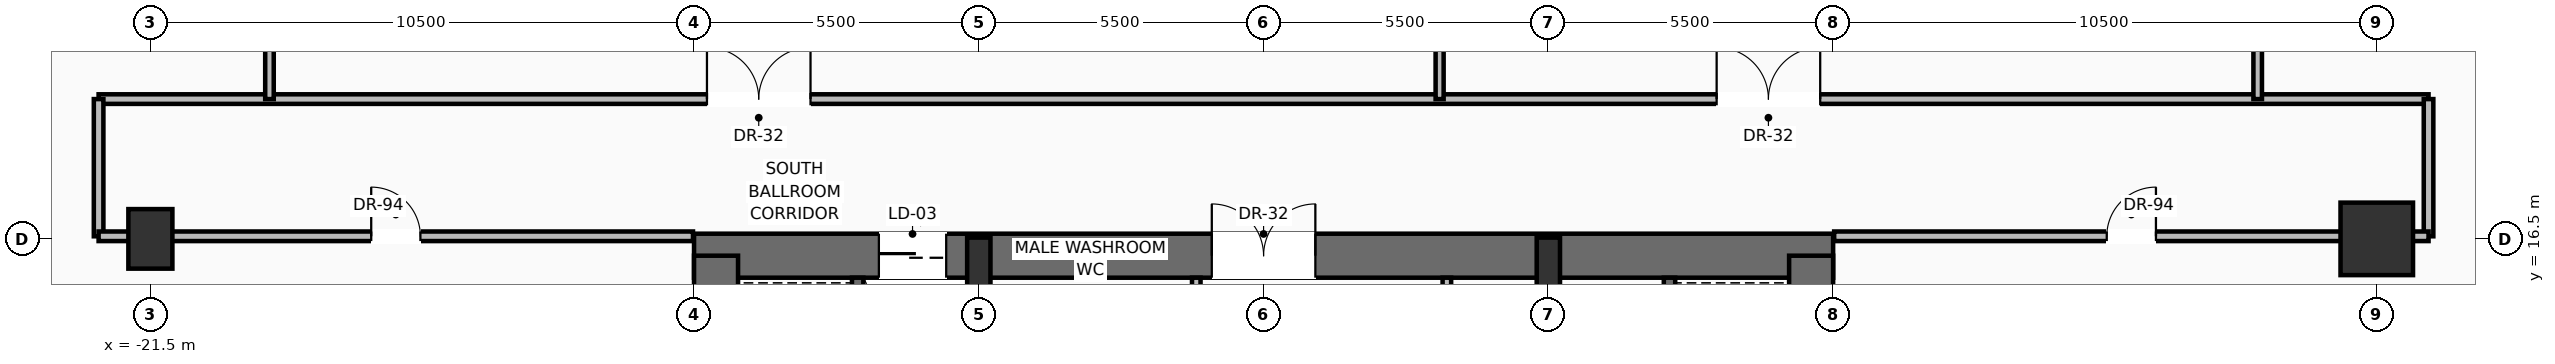
"""IFC4 building model, lengths in metres.
Left out: names, types, materials, properties, quantities, classifications, styles, units other than length and angle.
Written with IfcOpenShell. Run it as: python <this file> out.ifc"""

import sys

from ifc_helpers import new_model, si_unit, direction, frame, frame_2d, origin, origin_2d, place, context, subcontext, project, spatial, rectangle, hollow_rectangle, extrude, source, transform, mapped, element, fill, save


model = new_model("IFC4")
c1 = context("Model", 3, precision=1e-05, world=origin(), true_north=direction((0.0, 1.0)))
c2 = subcontext(c1, "Body", "Model", "MODEL_VIEW")
j1 = project(units=[si_unit("LENGTHUNIT", "METRE"), si_unit("PLANEANGLEUNIT", "RADIAN")], contexts=[c1])
p1 = place(None, origin())
s1 = spatial("IfcSite", under=j1, at=p1, CompositionType="ELEMENT")
p2 = place(p1, origin())
s2 = spatial("IfcBuilding", under=s1, at=p2, CompositionType="ELEMENT")
p3 = place(p2, frame((0.0, 0.0, 16.5)))
s3 = spatial("IfcBuildingStorey", under=s2, at=p3, CompositionType="ELEMENT", Elevation=16.5)
p4 = place(p3, frame((-11.0, 16.175, 0.0), z_axis=(0.0, 0.0, 1.0), x_axis=(1.0, 0.0, 0.0)))
e1 = element("IfcWall", 1, at=p4, inside=s3, PredefinedType="SHEAR", context=c2, shape_type="SweptSolid", body=[
    extrude(rectangle(XDim=22.0, YDim=0.85, at=frame_2d((11.0, 0.0))), origin(), (0.0, 0.0, 1.0), 5.05),
])
p5 = place(p4, frame((3.57, 0.0, 0.0)))
e2 = element("IfcOpeningElement", 2, at=p5, cuts=e1, PredefinedType="OPENING", context=c2, shape_type="SweptSolid", body=[
    extrude(rectangle(XDim=1.3, YDim=2.3, at=frame_2d((0.65, 1.15))), frame((0.0, 0.435, 0.0), z_axis=(0.0, -1.0, 0.0), x_axis=(1.0, 0.0, 0.0)), (0.0, 0.0, 1.0), 0.87),
])
p6 = place(p4, frame((10.0, 0.0, 0.0)))
e3 = element("IfcOpeningElement", 3, at=p6, cuts=e1, PredefinedType="OPENING", context=c2, shape_type="SweptSolid", body=[
    extrude(rectangle(XDim=2.0, YDim=2.4, at=frame_2d((1.0, 1.2))), frame((0.0, 0.435, 0.0), z_axis=(0.0, -1.0, 0.0), x_axis=(1.0, 0.0, 0.0)), (0.0, 0.0, 1.0), 0.87),
])
for number, where, z_axis, x_axis in (
    (4, (-10.575, 0.425, 0.0), (0.0, 0.0, 1.0), (0.0, 1.0, 0.0)),
    (5, (10.575, 0.425, 0.0), (0.0, 0.0, 1.0), (0.0, 1.0, 0.0)),
):
    element("IfcWall", number, at=place(p3, frame(where, z_axis=z_axis, x_axis=x_axis)), inside=s3, PredefinedType="SHEAR", context=c2, shape_type="SweptSolid", body=[
        extrude(rectangle(XDim=15.75, YDim=0.85, at=frame_2d((7.875, 0.0))), origin(), (0.0, 0.0, 1.0), 5.05),
    ])
p7 = place(p3, frame((-5.5, 0.425, 0.0), z_axis=(0.0, 0.0, 1.0), x_axis=(0.0, 1.0, 0.0)))
e6 = element("IfcWall", 6, at=p7, inside=s3, PredefinedType="SHEAR", context=c2, shape_type="SweptSolid", body=[
    extrude(rectangle(XDim=15.75, YDim=0.4, at=frame_2d((7.875, 0.0))), origin(), (0.0, 0.0, 1.0), 5.05),
])
p8 = place(p7, frame((9.075, 0.0, 0.0)))
e7 = element("IfcOpeningElement", 7, at=p8, cuts=e6, PredefinedType="OPENING", context=c2, shape_type="SweptSolid", body=[
    extrude(rectangle(XDim=1.1, YDim=2.2, at=frame_2d((0.55, 1.1))), frame((0.0, 0.21, 0.0), z_axis=(0.0, -1.0, 0.0), x_axis=(1.0, 0.0, 0.0)), (0.0, 0.0, 1.0), 0.42),
])
p9 = place(p3, frame((5.5, 0.425, 0.0), z_axis=(0.0, 0.0, 1.0), x_axis=(0.0, 1.0, 0.0)))
e8 = element("IfcWall", 8, at=p9, inside=s3, PredefinedType="SHEAR", context=c2, shape_type="SweptSolid", body=[
    extrude(rectangle(XDim=15.75, YDim=0.4, at=frame_2d((7.875, 0.0))), origin(), (0.0, 0.0, 1.0), 5.05),
])
p10 = place(p9, frame((9.075, 0.0, 0.0)))
e9 = element("IfcOpeningElement", 9, at=p10, cuts=e8, PredefinedType="OPENING", context=c2, shape_type="SweptSolid", body=[
    extrude(rectangle(XDim=1.1, YDim=2.2, at=frame_2d((0.55, 1.1))), frame((0.0, 0.21, 0.0), z_axis=(0.0, -1.0, 0.0), x_axis=(1.0, 0.0, 0.0)), (0.0, 0.0, 1.0), 0.42),
])
m1 = source(origin(), c2, "Body", "SweptSolid", [
    extrude(rectangle(XDim=0.45, YDim=0.95, at=origin_2d()), origin(), (0.0, 0.0, 1.0), 5.5),
])
for number, where, z_axis, x_axis in (
    (10, (-5.5, 16.05, 0.0), (0.0, 0.0, 1.0), (1.0, 0.0, 0.0)),
    (11, (5.5, 16.05, 0.0), (0.0, 0.0, 1.0), (1.0, 0.0, 0.0)),
):
    element("IfcColumn", number, at=place(p3, frame(where, z_axis=z_axis, x_axis=x_axis)), inside=s3, PredefinedType="PILASTER", context=c2, shape_type="MappedRepresentation", body=[
        mapped(m1, transform((0.0, 0.0, 0.0), scale=1.0)),
    ])
m2 = source(origin(), c2, "Body", "SweptSolid", [
    extrude(rectangle(XDim=0.85, YDim=1.15, at=origin_2d()), origin(), (0.0, 0.0, 1.0), 5.5),
])
p11 = place(p3, frame((-21.5, 16.5, 0.0), z_axis=(0.0, 0.0, 1.0), x_axis=(1.0, 0.0, 0.0)))
e12 = element("IfcColumn", 12, at=p11, inside=s3, PredefinedType="COLUMN", context=c2, shape_type="MappedRepresentation", body=[
    mapped(m2, transform((0.0, 0.0, 0.0), scale=1.0)),
])
m3 = source(origin(), c2, "Body", "SweptSolid", [
    extrude(hollow_rectangle(XDim=1.4, YDim=1.4, WallThickness=0.07, at=origin_2d()), origin(), (0.0, 0.0, 1.0), 5.5),
])
p12 = place(p3, frame((21.5, 16.5, 0.0), z_axis=(0.0, 0.0, 1.0), x_axis=(1.0, 0.0, 0.0)))
e13 = element("IfcColumn", 13, at=p12, inside=s3, PredefinedType="COLUMN", context=c2, shape_type="MappedRepresentation", body=[
    mapped(m3, transform((0.0, 0.0, 0.0), scale=1.0)),
])
for number, where, z_axis, x_axis in (
    (14, (-7.84, 11.87, 0.0), (0.0, 0.0, 1.0), (0.0, 1.0, 0.0)),
    (15, (7.84, 11.87, 0.0), (0.0, 0.0, 1.0), (0.0, 1.0, 0.0)),
):
    element("IfcWall", number, at=place(p3, frame(where, z_axis=z_axis, x_axis=x_axis)), inside=s3, PredefinedType="SOLIDWALL", context=c2, shape_type="SweptSolid", body=[
        extrude(rectangle(XDim=3.88, YDim=0.22, at=frame_2d((1.94, 0.0))), origin(), (0.0, 0.0, 1.0), 5.05),
    ])
p13 = place(p3, frame((-1.3, 13.6, 0.0), z_axis=(0.0, 0.0, 1.0), x_axis=(0.0, 1.0, 0.0)))
e16 = element("IfcWall", 16, at=p13, inside=s3, PredefinedType="PARTITIONING", context=c2, shape_type="SweptSolid", body=[
    extrude(rectangle(XDim=2.15, YDim=0.165, at=frame_2d((1.075, 0.0))), origin(), (0.0, 0.0, 1.0), 5.042),
])
p14 = place(p13, frame((0.55, 0.0, 0.0)))
e17 = element("IfcOpeningElement", 17, at=p14, cuts=e16, PredefinedType="OPENING", context=c2, shape_type="SweptSolid", body=[
    extrude(rectangle(XDim=0.9, YDim=2.1, at=frame_2d((0.45, 1.05))), frame((0.0, 0.093, 0.0), z_axis=(0.0, -1.0, 0.0), x_axis=(1.0, 0.0, 0.0)), (0.0, 0.0, 1.0), 0.185),
])
p15 = place(p3, frame((3.54, 11.22, 0.0), z_axis=(0.0, 0.0, 1.0), x_axis=(0.0, 1.0, 0.0)))
e18 = element("IfcWall", 18, at=p15, inside=s3, PredefinedType="PARTITIONING", context=c2, shape_type="SweptSolid", body=[
    extrude(rectangle(XDim=4.53, YDim=0.165, at=frame_2d((2.265, 0.0))), origin(), (0.0, 0.0, 1.0), 5.042),
])
p16 = place(p15, frame((1.25, 0.0, 0.0)))
e19 = element("IfcOpeningElement", 19, at=p16, cuts=e18, PredefinedType="OPENING", context=c2, shape_type="SweptSolid", body=[
    extrude(rectangle(XDim=0.9, YDim=2.1, at=frame_2d((0.45, 1.05))), frame((0.0, 0.093, 0.0), z_axis=(0.0, -1.0, 0.0), x_axis=(1.0, 0.0, 0.0)), (0.0, 0.0, 1.0), 0.185),
])
p17 = place(p3, frame((-22.5, 19.2, 0.0), z_axis=(0.0, 0.0, 1.0), x_axis=(1.0, 0.0, 0.0)))
e20 = element("IfcWall", 20, at=p17, inside=s3, PredefinedType="PARTITIONING", context=c2, shape_type="SweptSolid", body=[
    extrude(rectangle(XDim=45.0, YDim=0.185, at=frame_2d((22.5, 0.0))), origin(), (0.0, 0.0, 1.0), 4.002),
])
p18 = place(p17, frame((11.75, 0.0, 0.0)))
e21 = element("IfcOpeningElement", 21, at=p18, cuts=e20, PredefinedType="OPENING", context=c2, shape_type="SweptSolid", body=[
    extrude(rectangle(XDim=2.0, YDim=2.4, at=frame_2d((1.0, 1.2))), frame((0.0, 0.103, 0.0), z_axis=(0.0, -1.0, 0.0), x_axis=(1.0, 0.0, 0.0)), (0.0, 0.0, 1.0), 0.205),
])
p19 = place(p17, frame((31.25, 0.0, 0.0)))
e22 = element("IfcOpeningElement", 22, at=p19, cuts=e20, PredefinedType="OPENING", context=c2, shape_type="SweptSolid", body=[
    extrude(rectangle(XDim=2.0, YDim=2.4, at=frame_2d((1.0, 1.2))), frame((0.0, 0.103, 0.0), z_axis=(0.0, -1.0, 0.0), x_axis=(1.0, 0.0, 0.0)), (0.0, 0.0, 1.0), 0.205),
])
for number, where, z_axis, x_axis in (
    (23, (-22.5, 16.55, 0.0), (0.0, 0.0, 1.0), (0.0, 1.0, 0.0)),
    (24, (22.5, 16.55, 0.0), (0.0, 0.0, 1.0), (0.0, 1.0, 0.0)),
):
    element("IfcWall", number, at=place(p3, frame(where, z_axis=z_axis, x_axis=x_axis)), inside=s3, PredefinedType="PARTITIONING", context=c2, shape_type="SweptSolid", body=[
        extrude(rectangle(XDim=2.65, YDim=0.185, at=frame_2d((1.325, 0.0))), origin(), (0.0, 0.0, 1.0), 5.042),
    ])
p20 = place(p3, frame((-22.5, 16.55, 0.0), z_axis=(0.0, 0.0, 1.0), x_axis=(1.0, 0.0, 0.0)))
e25 = element("IfcWall", 25, at=p20, inside=s3, PredefinedType="PARTITIONING", context=c2, shape_type="SweptSolid", body=[
    extrude(rectangle(XDim=11.48, YDim=0.185, at=frame_2d((5.74, 0.0))), origin(), (0.0, 0.0, 1.0), 4.002),
])
p21 = place(p20, frame((5.265, 0.0, 0.0)))
e26 = element("IfcOpeningElement", 26, at=p21, cuts=e25, PredefinedType="OPENING", context=c2, shape_type="SweptSolid", body=[
    extrude(rectangle(XDim=0.95, YDim=2.2, at=frame_2d((0.475, 1.1))), frame((0.0, 0.103, 0.0), z_axis=(0.0, -1.0, 0.0), x_axis=(1.0, 0.0, 0.0)), (0.0, 0.0, 1.0), 0.205),
])
p22 = place(p3, frame((11.02, 16.55, 0.0), z_axis=(0.0, 0.0, 1.0), x_axis=(1.0, 0.0, 0.0)))
e27 = element("IfcWall", 27, at=p22, inside=s3, PredefinedType="PARTITIONING", context=c2, shape_type="SweptSolid", body=[
    extrude(rectangle(XDim=11.48, YDim=0.185, at=frame_2d((5.74, 0.0))), origin(), (0.0, 0.0, 1.0), 4.002),
])
p23 = place(p22, frame((5.265, 0.0, 0.0)))
e28 = element("IfcOpeningElement", 28, at=p23, cuts=e27, PredefinedType="OPENING", context=c2, shape_type="SweptSolid", body=[
    extrude(rectangle(XDim=0.95, YDim=2.2, at=frame_2d((0.475, 1.1))), frame((0.0, 0.103, 0.0), z_axis=(0.0, -1.0, 0.0), x_axis=(1.0, 0.0, 0.0)), (0.0, 0.0, 1.0), 0.205),
])
p24 = place(p3, frame((-19.2, 19.2, 0.0), z_axis=(0.0, 0.0, 1.0), x_axis=(0.0, 1.0, 0.0)))
e29 = element("IfcWall", 29, at=p24, inside=s3, PredefinedType="PARTITIONING", context=c2, shape_type="SweptSolid", body=[
    extrude(rectangle(XDim=20.1, YDim=0.165, at=frame_2d((10.05, 0.0))), origin(), (0.0, 0.0, 1.0), 4.002),
])
p25 = place(p24, frame((8.329, 0.0, 0.0)))
e30 = element("IfcOpeningElement", 30, at=p25, cuts=e29, PredefinedType="OPENING", context=c2, shape_type="SweptSolid", body=[
    extrude(rectangle(XDim=1.5, YDim=2.25, at=frame_2d((0.75, 1.125))), frame((0.0, 0.093, 0.0), z_axis=(0.0, -1.0, 0.0), x_axis=(1.0, 0.0, 0.0)), (0.0, 0.0, 1.0), 0.185),
])
p26 = place(p3, frame((19.2, 19.2, 0.0), z_axis=(0.0, 0.0, 1.0), x_axis=(0.0, 1.0, 0.0)))
e31 = element("IfcWall", 31, at=p26, inside=s3, PredefinedType="PARTITIONING", context=c2, shape_type="SweptSolid", body=[
    extrude(rectangle(XDim=20.1, YDim=0.165, at=frame_2d((10.05, 0.0))), origin(), (0.0, 0.0, 1.0), 4.002),
])
p27 = place(p26, frame((8.329, 0.0, 0.0)))
e32 = element("IfcOpeningElement", 32, at=p27, cuts=e31, PredefinedType="OPENING", context=c2, shape_type="SweptSolid", body=[
    extrude(rectangle(XDim=1.5, YDim=2.25, at=frame_2d((0.75, 1.125))), frame((0.0, 0.093, 0.0), z_axis=(0.0, -1.0, 0.0), x_axis=(1.0, 0.0, 0.0)), (0.0, 0.0, 1.0), 0.185),
])
p28 = place(p3, frame((3.4, 19.2, 0.0), z_axis=(0.0, 0.0, 1.0), x_axis=(0.0, 1.0, 0.0)))
e33 = element("IfcWall", 33, at=p28, inside=s3, PredefinedType="MOVABLE", context=c2, shape_type="SweptSolid", body=[
    extrude(rectangle(XDim=20.1, YDim=0.155, at=frame_2d((10.05, 0.0))), origin(), (0.0, 0.0, 1.0), 4.002),
])
p29 = place(p28, frame((9.3, 0.0, 0.0)))
e34 = element("IfcOpeningElement", 34, at=p29, cuts=e33, PredefinedType="OPENING", context=c2, shape_type="SweptSolid", body=[
    extrude(rectangle(XDim=1.5, YDim=2.25, at=frame_2d((0.75, 1.125))), frame((0.0, 0.087, 0.0), z_axis=(0.0, -1.0, 0.0), x_axis=(1.0, 0.0, 0.0)), (0.0, 0.0, 1.0), 0.175),
])
m4 = source(origin(), c2, "Body", "SweptSolid", [
    extrude(rectangle(XDim=1.3, YDim=2.3, at=frame_2d((0.65, 1.15))), frame((0.0, 0.025, 0.0), z_axis=(0.0, -1.0, 0.0), x_axis=(1.0, 0.0, 0.0)), (0.0, 0.0, 1.0), 0.05),
])
p30 = place(p5, origin())
e35 = element("IfcDoor", 35, at=p30, inside=s3, OperationType="SLIDING_TO_RIGHT", PredefinedType="DOOR", context=c2, shape_type="MappedRepresentation", body=[
    mapped(m4, transform((0.0, 0.0, 0.0), scale=1.0)),
])
fill(e2, e35)
m5 = source(origin(), c2, "Body", "SweptSolid", [
    extrude(rectangle(XDim=2.0, YDim=2.4, at=frame_2d((1.0, 1.2))), frame((0.0, 0.025, 0.0), z_axis=(0.0, -1.0, 0.0), x_axis=(1.0, 0.0, 0.0)), (0.0, 0.0, 1.0), 0.05),
])
p31 = place(p6, origin())
e36 = element("IfcDoor", 36, at=p31, inside=s3, OperationType="DOUBLE_DOOR_SINGLE_SWING", PredefinedType="DOOR", context=c2, shape_type="MappedRepresentation", body=[
    mapped(m5, transform((0.0, 0.0, 0.0), scale=1.0)),
])
fill(e3, e36)
p32 = place(p18, origin())
e37 = element("IfcDoor", 37, at=p32, inside=s3, OperationType="DOUBLE_DOOR_SINGLE_SWING", PredefinedType="DOOR", context=c2, shape_type="MappedRepresentation", body=[
    mapped(m5, transform((0.0, 0.0, 0.0), scale=1.0)),
])
fill(e21, e37)
p33 = place(p19, origin())
e38 = element("IfcDoor", 38, at=p33, inside=s3, OperationType="DOUBLE_DOOR_SINGLE_SWING", PredefinedType="DOOR", context=c2, shape_type="MappedRepresentation", body=[
    mapped(m5, transform((0.0, 0.0, 0.0), scale=1.0)),
])
fill(e22, e38)
m6 = source(origin(), c2, "Body", "SweptSolid", [
    extrude(rectangle(XDim=0.95, YDim=2.2, at=frame_2d((0.475, 1.1))), frame((0.0, 0.025, 0.0), z_axis=(0.0, -1.0, 0.0), x_axis=(1.0, 0.0, 0.0)), (0.0, 0.0, 1.0), 0.05),
])
p34 = place(p21, origin())
e39 = element("IfcDoor", 39, at=p34, inside=s3, OperationType="SINGLE_SWING_LEFT", PredefinedType="DOOR", context=c2, shape_type="MappedRepresentation", body=[
    mapped(m6, transform((0.0, 0.0, 0.0), scale=1.0)),
])
fill(e26, e39)
p35 = place(p23, origin())
e40 = element("IfcDoor", 40, at=p35, inside=s3, OperationType="SINGLE_SWING_RIGHT", PredefinedType="DOOR", context=c2, shape_type="MappedRepresentation", body=[
    mapped(m6, transform((0.0, 0.0, 0.0), scale=1.0)),
])
fill(e28, e40)
save(model, sys.argv[1])
